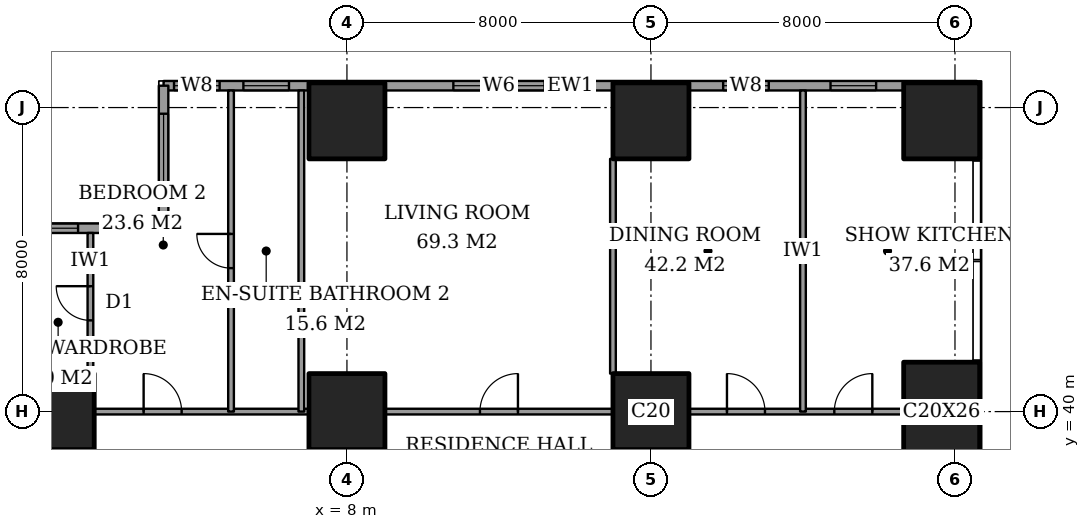
"""IFC4 building model, lengths in metres.
Left out: names, types, materials, properties, quantities, classifications, styles, units other than length and angle.
Written with IfcOpenShell. Run it as: python <this file> out.ifc"""

import sys

from ifc_helpers import new_model, si_unit, direction, frame, frame_2d, origin, origin_2d, place, context, subcontext, project, spatial, rectangle, extrude, element, fill, save


model = new_model("IFC4")
c1 = context("Model", 3, precision=1e-05, world=origin(), true_north=direction((0.0, 1.0)))
c2 = subcontext(c1, "Body", "Model", "MODEL_VIEW")
j1 = project(units=[si_unit("LENGTHUNIT", "METRE"), si_unit("PLANEANGLEUNIT", "RADIAN")], contexts=[c1])
p1 = place(None, origin())
s1 = spatial("IfcSite", under=j1, at=p1, CompositionType="ELEMENT")
p2 = place(p1, origin())
s2 = spatial("IfcBuilding", under=s1, at=p2, CompositionType="ELEMENT")
p3 = place(p2, frame((0.0, 0.0, 76.4)))
s3 = spatial("IfcBuildingStorey", under=s2, at=p3, CompositionType="ELEMENT", Elevation=76.4)
for number, where, z_axis, x_axis in (
    (1, (0.35, 40.0, 0.0), (0.0, 0.0, 1.0), (1.0, 0.0, 0.0)),
    (2, (8.0, 40.0, 0.0), (0.0, 0.0, 1.0), (1.0, 0.0, 0.0)),
    (3, (8.0, 47.65, 0.0), (0.0, 0.0, 1.0), (1.0, 0.0, 0.0)),
    (4, (16.0, 40.0, 0.0), (0.0, 0.0, 1.0), (1.0, 0.0, 0.0)),
    (5, (16.0, 47.65, 0.0), (0.0, 0.0, 1.0), (1.0, 0.0, 0.0)),
):
    element("IfcColumn", number, at=place(p3, frame(where, z_axis=z_axis, x_axis=x_axis)), inside=s3, PredefinedType="COLUMN", context=c2, shape_type="SweptSolid", body=[
        extrude(rectangle(XDim=2.0, YDim=2.0, at=origin_2d()), origin(), (0.0, 0.0, 1.0), 3.6),
    ])
p4 = place(p3, frame((23.65, 40.0, 0.0), z_axis=(0.0, 0.0, 1.0), x_axis=(1.0, 0.0, 0.0)))
e6 = element("IfcColumn", 6, at=p4, inside=s3, PredefinedType="COLUMN", context=c2, shape_type="SweptSolid", body=[
    extrude(rectangle(XDim=2.0, YDim=2.6, at=origin_2d()), origin(), (0.0, 0.0, 1.0), 3.6),
])
p5 = place(p3, frame((23.65, 47.65, 0.0), z_axis=(0.0, 0.0, 1.0), x_axis=(1.0, 0.0, 0.0)))
e7 = element("IfcColumn", 7, at=p5, inside=s3, PredefinedType="COLUMN", context=c2, shape_type="SweptSolid", body=[
    extrude(rectangle(XDim=2.0, YDim=2.0, at=origin_2d()), origin(), (0.0, 0.0, 1.0), 3.6),
])
p6 = place(p3, frame((24.575, 48.575, 0.0), z_axis=(0.0, 0.0, 1.0), x_axis=(-1.0, 0.0, 0.0)))
e8 = element("IfcWall", 8, at=p6, inside=s3, PredefinedType="SOLIDWALL", context=c2, shape_type="SweptSolid", body=[
    extrude(rectangle(XDim=21.4, YDim=0.25, at=frame_2d((10.7, 0.0))), origin(), (0.0, 0.0, 1.0), 3.6),
])
p7 = place(p6, frame((2.65, 0.0, 0.6)))
e9 = element("IfcOpeningElement", 9, at=p7, cuts=e8, PredefinedType="OPENING", context=c2, shape_type="SweptSolid", body=[
    extrude(rectangle(XDim=1.2, YDim=2.0, at=frame_2d((0.6, 1.0))), frame((0.0, 0.135, 0.0), z_axis=(0.0, -1.0, 0.0), x_axis=(1.0, 0.0, 0.0)), (0.0, 0.0, 1.0), 0.27),
])
p8 = place(p6, frame((5.475, 0.0, 0.6)))
e10 = element("IfcOpeningElement", 10, at=p8, cuts=e8, PredefinedType="OPENING", context=c2, shape_type="SweptSolid", body=[
    extrude(rectangle(XDim=1.2, YDim=2.0, at=frame_2d((0.6, 1.0))), frame((0.0, 0.135, 0.0), z_axis=(0.0, -1.0, 0.0), x_axis=(1.0, 0.0, 0.0)), (0.0, 0.0, 1.0), 0.27),
])
p9 = place(p6, frame((11.375, 0.0, 0.6)))
e11 = element("IfcOpeningElement", 11, at=p9, cuts=e8, PredefinedType="OPENING", context=c2, shape_type="SweptSolid", body=[
    extrude(rectangle(XDim=2.4, YDim=2.0, at=frame_2d((1.2, 1.0))), frame((0.0, 0.135, 0.0), z_axis=(0.0, -1.0, 0.0), x_axis=(1.0, 0.0, 0.0)), (0.0, 0.0, 1.0), 0.27),
])
p10 = place(p6, frame((18.1, 0.0, 0.6)))
e12 = element("IfcOpeningElement", 12, at=p10, cuts=e8, PredefinedType="OPENING", context=c2, shape_type="SweptSolid", body=[
    extrude(rectangle(XDim=1.2, YDim=2.0, at=frame_2d((0.6, 1.0))), frame((0.0, 0.135, 0.0), z_axis=(0.0, -1.0, 0.0), x_axis=(1.0, 0.0, 0.0)), (0.0, 0.0, 1.0), 0.27),
])
p11 = place(p6, frame((19.925, 0.0, 0.6)))
e13 = element("IfcOpeningElement", 13, at=p11, cuts=e8, PredefinedType="OPENING", context=c2, shape_type="SweptSolid", body=[
    extrude(rectangle(XDim=1.2, YDim=2.0, at=frame_2d((0.6, 1.0))), frame((0.0, 0.135, 0.0), z_axis=(0.0, -1.0, 0.0), x_axis=(1.0, 0.0, 0.0)), (0.0, 0.0, 1.0), 0.27),
])
p12 = place(p3, frame((3.175, 48.575, 0.0), z_axis=(0.0, 0.0, 1.0), x_axis=(0.0, -1.0, 0.0)))
e14 = element("IfcWall", 14, at=p12, inside=s3, PredefinedType="SOLIDWALL", context=c2, shape_type="SweptSolid", body=[
    extrude(rectangle(XDim=3.75, YDim=0.25, at=frame_2d((1.875, 0.0))), origin(), (0.0, 0.0, 1.0), 3.6),
])
p13 = place(p12, frame((0.738, 0.0, 0.6)))
e15 = element("IfcOpeningElement", 15, at=p13, cuts=e14, PredefinedType="OPENING", context=c2, shape_type="SweptSolid", body=[
    extrude(rectangle(XDim=2.4, YDim=2.0, at=frame_2d((1.2, 1.0))), frame((0.0, 0.135, 0.0), z_axis=(0.0, -1.0, 0.0), x_axis=(1.0, 0.0, 0.0)), (0.0, 0.0, 1.0), 0.27),
])
p14 = place(p3, frame((3.175, 44.825, 0.0), z_axis=(0.0, 0.0, 1.0), x_axis=(-1.0, 0.0, 0.0)))
e16 = element("IfcWall", 16, at=p14, inside=s3, PredefinedType="SOLIDWALL", context=c2, shape_type="SweptSolid", body=[
    extrude(rectangle(XDim=3.75, YDim=0.25, at=frame_2d((1.875, 0.0))), origin(), (0.0, 0.0, 1.0), 3.6),
])
p15 = place(p14, frame((0.363, 0.0, 0.6)))
e17 = element("IfcOpeningElement", 17, at=p15, cuts=e16, PredefinedType="OPENING", context=c2, shape_type="SweptSolid", body=[
    extrude(rectangle(XDim=1.2, YDim=2.0, at=frame_2d((0.6, 1.0))), frame((0.0, 0.135, 0.0), z_axis=(0.0, -1.0, 0.0), x_axis=(1.0, 0.0, 0.0)), (0.0, 0.0, 1.0), 0.27),
])
p16 = place(p14, frame((2.25, 0.0, 0.6)))
e18 = element("IfcOpeningElement", 18, at=p16, cuts=e16, PredefinedType="OPENING", context=c2, shape_type="SweptSolid", body=[
    extrude(rectangle(XDim=1.2, YDim=2.0, at=frame_2d((0.6, 1.0))), frame((0.0, 0.135, 0.0), z_axis=(0.0, -1.0, 0.0), x_axis=(1.0, 0.0, 0.0)), (0.0, 0.0, 1.0), 0.27),
])
p17 = place(p3, frame((1.35, 40.0, 0.0), z_axis=(0.0, 0.0, 1.0), x_axis=(1.0, 0.0, 0.0)))
e19 = element("IfcWall", 19, at=p17, inside=s3, PredefinedType="PARTITIONING", context=c2, shape_type="SweptSolid", body=[
    extrude(rectangle(XDim=5.65, YDim=0.15, at=frame_2d((2.825, 0.0))), origin(), (0.0, 0.0, 1.0), 3.35),
])
p18 = place(p17, frame((1.3, 0.0, 0.0)))
e20 = element("IfcOpeningElement", 20, at=p18, cuts=e19, PredefinedType="OPENING", context=c2, shape_type="SweptSolid", body=[
    extrude(rectangle(XDim=1.0, YDim=2.1, at=frame_2d((0.5, 1.05))), frame((0.0, 0.085, 0.0), z_axis=(0.0, -1.0, 0.0), x_axis=(1.0, 0.0, 0.0)), (0.0, 0.0, 1.0), 0.17),
])
p19 = place(p3, frame((9.0, 40.0, 0.0), z_axis=(0.0, 0.0, 1.0), x_axis=(1.0, 0.0, 0.0)))
e21 = element("IfcWall", 21, at=p19, inside=s3, PredefinedType="PARTITIONING", context=c2, shape_type="SweptSolid", body=[
    extrude(rectangle(XDim=6.0, YDim=0.15, at=frame_2d((3.0, 0.0))), origin(), (0.0, 0.0, 1.0), 3.35),
])
p20 = place(p19, frame((2.5, 0.0, 0.0)))
e22 = element("IfcOpeningElement", 22, at=p20, cuts=e21, PredefinedType="OPENING", context=c2, shape_type="SweptSolid", body=[
    extrude(rectangle(XDim=1.0, YDim=2.1, at=frame_2d((0.5, 1.05))), frame((0.0, 0.085, 0.0), z_axis=(0.0, -1.0, 0.0), x_axis=(1.0, 0.0, 0.0)), (0.0, 0.0, 1.0), 0.17),
])
p21 = place(p3, frame((17.0, 40.0, 0.0), z_axis=(0.0, 0.0, 1.0), x_axis=(1.0, 0.0, 0.0)))
e23 = element("IfcWall", 23, at=p21, inside=s3, PredefinedType="PARTITIONING", context=c2, shape_type="SweptSolid", body=[
    extrude(rectangle(XDim=5.65, YDim=0.15, at=frame_2d((2.825, 0.0))), origin(), (0.0, 0.0, 1.0), 3.35),
])
p22 = place(p21, frame((1.0, 0.0, 0.0)))
e24 = element("IfcOpeningElement", 24, at=p22, cuts=e23, PredefinedType="OPENING", context=c2, shape_type="SweptSolid", body=[
    extrude(rectangle(XDim=1.0, YDim=2.1, at=frame_2d((0.5, 1.05))), frame((0.0, 0.085, 0.0), z_axis=(0.0, -1.0, 0.0), x_axis=(1.0, 0.0, 0.0)), (0.0, 0.0, 1.0), 0.17),
])
p23 = place(p21, frame((3.825, 0.0, 0.0)))
e25 = element("IfcOpeningElement", 25, at=p23, cuts=e23, PredefinedType="OPENING", context=c2, shape_type="SweptSolid", body=[
    extrude(rectangle(XDim=1.0, YDim=2.1, at=frame_2d((0.5, 1.05))), frame((0.0, 0.085, 0.0), z_axis=(0.0, -1.0, 0.0), x_axis=(1.0, 0.0, 0.0)), (0.0, 0.0, 1.0), 0.17),
])
p24 = place(p3, frame((1.25, 41.0, 0.0), z_axis=(0.0, 0.0, 1.0), x_axis=(0.0, 1.0, 0.0)))
e26 = element("IfcWall", 26, at=p24, inside=s3, PredefinedType="PARTITIONING", context=c2, shape_type="SweptSolid", body=[
    extrude(rectangle(XDim=3.7, YDim=0.15, at=frame_2d((1.85, 0.0))), origin(), (0.0, 0.0, 1.0), 3.35),
])
p25 = place(p24, frame((1.4, 0.0, 0.0)))
e27 = element("IfcOpeningElement", 27, at=p25, cuts=e26, PredefinedType="OPENING", context=c2, shape_type="SweptSolid", body=[
    extrude(rectangle(XDim=0.9, YDim=2.1, at=frame_2d((0.45, 1.05))), frame((0.0, 0.085, 0.0), z_axis=(0.0, -1.0, 0.0), x_axis=(1.0, 0.0, 0.0)), (0.0, 0.0, 1.0), 0.17),
])
p26 = place(p3, frame((4.95, 40.0, 0.0), z_axis=(0.0, 0.0, 1.0), x_axis=(0.0, 1.0, 0.0)))
e28 = element("IfcWall", 28, at=p26, inside=s3, PredefinedType="PARTITIONING", context=c2, shape_type="SweptSolid", body=[
    extrude(rectangle(XDim=8.45, YDim=0.15, at=frame_2d((4.225, 0.0))), origin(), (0.0, 0.0, 1.0), 3.35),
])
p27 = place(p26, frame((3.775, 0.0, 0.0)))
e29 = element("IfcOpeningElement", 29, at=p27, cuts=e28, PredefinedType="OPENING", context=c2, shape_type="SweptSolid", body=[
    extrude(rectangle(XDim=0.9, YDim=2.1, at=frame_2d((0.45, 1.05))), frame((0.0, 0.085, 0.0), z_axis=(0.0, -1.0, 0.0), x_axis=(1.0, 0.0, 0.0)), (0.0, 0.0, 1.0), 0.17),
])
p28 = place(p3, frame((6.8, 40.0, 0.0), z_axis=(0.0, 0.0, 1.0), x_axis=(0.0, 1.0, 0.0)))
e30 = element("IfcWall", 30, at=p28, inside=s3, PredefinedType="PARTITIONING", context=c2, shape_type="SweptSolid", body=[
    extrude(rectangle(XDim=8.45, YDim=0.15, at=frame_2d((4.225, 0.0))), origin(), (0.0, 0.0, 1.0), 3.35),
])
p29 = place(p3, frame((15.0, 41.0, 0.0), z_axis=(0.0, 0.0, 1.0), x_axis=(0.0, 1.0, 0.0)))
e31 = element("IfcWall", 31, at=p29, inside=s3, PredefinedType="PARTITIONING", context=c2, shape_type="SweptSolid", body=[
    extrude(rectangle(XDim=5.65, YDim=0.15, at=frame_2d((2.825, 0.0))), origin(), (0.0, 0.0, 1.0), 3.35),
])
p30 = place(p3, frame((20.0, 40.0, 0.0), z_axis=(0.0, 0.0, 1.0), x_axis=(0.0, 1.0, 0.0)))
e32 = element("IfcWall", 32, at=p30, inside=s3, PredefinedType="PARTITIONING", context=c2, shape_type="SweptSolid", body=[
    extrude(rectangle(XDim=8.45, YDim=0.15, at=frame_2d((4.225, 0.0))), origin(), (0.0, 0.0, 1.0), 3.35),
])
p31 = place(p7, origin())
e33 = element("IfcWindow", 33, at=p31, inside=s3, PartitioningType="SINGLE_PANEL", PredefinedType="WINDOW", context=c2, shape_type="SweptSolid", body=[
    extrude(rectangle(XDim=1.2, YDim=2.0, at=frame_2d((0.6, 1.0))), frame((0.0, 0.03, 0.0), z_axis=(0.0, -1.0, 0.0), x_axis=(1.0, 0.0, 0.0)), (0.0, 0.0, 1.0), 0.06),
])
fill(e9, e33)
p32 = place(p8, origin())
e34 = element("IfcWindow", 34, at=p32, inside=s3, PartitioningType="SINGLE_PANEL", PredefinedType="WINDOW", context=c2, shape_type="SweptSolid", body=[
    extrude(rectangle(XDim=1.2, YDim=2.0, at=frame_2d((0.6, 1.0))), frame((0.0, 0.03, 0.0), z_axis=(0.0, -1.0, 0.0), x_axis=(1.0, 0.0, 0.0)), (0.0, 0.0, 1.0), 0.06),
])
fill(e10, e34)
p33 = place(p9, origin())
e35 = element("IfcWindow", 35, at=p33, inside=s3, PartitioningType="SINGLE_PANEL", PredefinedType="WINDOW", context=c2, shape_type="SweptSolid", body=[
    extrude(rectangle(XDim=2.4, YDim=2.0, at=frame_2d((1.2, 1.0))), frame((0.0, 0.03, 0.0), z_axis=(0.0, -1.0, 0.0), x_axis=(1.0, 0.0, 0.0)), (0.0, 0.0, 1.0), 0.06),
])
fill(e11, e35)
p34 = place(p10, origin())
e36 = element("IfcWindow", 36, at=p34, inside=s3, PartitioningType="SINGLE_PANEL", PredefinedType="WINDOW", context=c2, shape_type="SweptSolid", body=[
    extrude(rectangle(XDim=1.2, YDim=2.0, at=frame_2d((0.6, 1.0))), frame((0.0, 0.03, 0.0), z_axis=(0.0, -1.0, 0.0), x_axis=(1.0, 0.0, 0.0)), (0.0, 0.0, 1.0), 0.06),
])
fill(e12, e36)
p35 = place(p11, origin())
e37 = element("IfcWindow", 37, at=p35, inside=s3, PartitioningType="SINGLE_PANEL", PredefinedType="WINDOW", context=c2, shape_type="SweptSolid", body=[
    extrude(rectangle(XDim=1.2, YDim=2.0, at=frame_2d((0.6, 1.0))), frame((0.0, 0.03, 0.0), z_axis=(0.0, -1.0, 0.0), x_axis=(1.0, 0.0, 0.0)), (0.0, 0.0, 1.0), 0.06),
])
fill(e13, e37)
p36 = place(p13, origin())
e38 = element("IfcWindow", 38, at=p36, inside=s3, PartitioningType="SINGLE_PANEL", PredefinedType="WINDOW", context=c2, shape_type="SweptSolid", body=[
    extrude(rectangle(XDim=2.4, YDim=2.0, at=frame_2d((1.2, 1.0))), frame((0.0, 0.03, 0.0), z_axis=(0.0, -1.0, 0.0), x_axis=(1.0, 0.0, 0.0)), (0.0, 0.0, 1.0), 0.06),
])
fill(e15, e38)
p37 = place(p15, origin())
e39 = element("IfcWindow", 39, at=p37, inside=s3, PartitioningType="SINGLE_PANEL", PredefinedType="WINDOW", context=c2, shape_type="SweptSolid", body=[
    extrude(rectangle(XDim=1.2, YDim=2.0, at=frame_2d((0.6, 1.0))), frame((0.0, 0.03, 0.0), z_axis=(0.0, -1.0, 0.0), x_axis=(1.0, 0.0, 0.0)), (0.0, 0.0, 1.0), 0.06),
])
fill(e17, e39)
p38 = place(p16, origin())
e40 = element("IfcWindow", 40, at=p38, inside=s3, PartitioningType="SINGLE_PANEL", PredefinedType="WINDOW", context=c2, shape_type="SweptSolid", body=[
    extrude(rectangle(XDim=1.2, YDim=2.0, at=frame_2d((0.6, 1.0))), frame((0.0, 0.03, 0.0), z_axis=(0.0, -1.0, 0.0), x_axis=(1.0, 0.0, 0.0)), (0.0, 0.0, 1.0), 0.06),
])
fill(e18, e40)
p39 = place(p25, origin())
e41 = element("IfcDoor", 41, at=p39, inside=s3, OperationType="SINGLE_SWING_LEFT", PredefinedType="DOOR", context=c2, shape_type="SweptSolid", body=[
    extrude(rectangle(XDim=0.9, YDim=2.1, at=frame_2d((0.45, 1.05))), frame((0.0, 0.025, 0.0), z_axis=(0.0, -1.0, 0.0), x_axis=(1.0, 0.0, 0.0)), (0.0, 0.0, 1.0), 0.05),
])
fill(e27, e41)
p40 = place(p18, origin())
e42 = element("IfcDoor", 42, at=p40, inside=s3, OperationType="SINGLE_SWING_RIGHT", PredefinedType="DOOR", context=c2, shape_type="SweptSolid", body=[
    extrude(rectangle(XDim=1.0, YDim=2.1, at=frame_2d((0.5, 1.05))), frame((0.0, 0.025, 0.0), z_axis=(0.0, -1.0, 0.0), x_axis=(1.0, 0.0, 0.0)), (0.0, 0.0, 1.0), 0.05),
])
fill(e20, e42)
p41 = place(p27, origin())
e43 = element("IfcDoor", 43, at=p41, inside=s3, OperationType="SINGLE_SWING_LEFT", PredefinedType="DOOR", context=c2, shape_type="SweptSolid", body=[
    extrude(rectangle(XDim=0.9, YDim=2.1, at=frame_2d((0.45, 1.05))), frame((0.0, 0.025, 0.0), z_axis=(0.0, -1.0, 0.0), x_axis=(1.0, 0.0, 0.0)), (0.0, 0.0, 1.0), 0.05),
])
fill(e29, e43)
p42 = place(p20, origin())
e44 = element("IfcDoor", 44, at=p42, inside=s3, OperationType="SINGLE_SWING_LEFT", PredefinedType="DOOR", context=c2, shape_type="SweptSolid", body=[
    extrude(rectangle(XDim=1.0, YDim=2.1, at=frame_2d((0.5, 1.05))), frame((0.0, 0.025, 0.0), z_axis=(0.0, -1.0, 0.0), x_axis=(1.0, 0.0, 0.0)), (0.0, 0.0, 1.0), 0.05),
])
fill(e22, e44)
p43 = place(p22, origin())
e45 = element("IfcDoor", 45, at=p43, inside=s3, OperationType="SINGLE_SWING_RIGHT", PredefinedType="DOOR", context=c2, shape_type="SweptSolid", body=[
    extrude(rectangle(XDim=1.0, YDim=2.1, at=frame_2d((0.5, 1.05))), frame((0.0, 0.025, 0.0), z_axis=(0.0, -1.0, 0.0), x_axis=(1.0, 0.0, 0.0)), (0.0, 0.0, 1.0), 0.05),
])
fill(e24, e45)
p44 = place(p23, origin())
e46 = element("IfcDoor", 46, at=p44, inside=s3, OperationType="SINGLE_SWING_LEFT", PredefinedType="DOOR", context=c2, shape_type="SweptSolid", body=[
    extrude(rectangle(XDim=1.0, YDim=2.1, at=frame_2d((0.5, 1.05))), frame((0.0, 0.025, 0.0), z_axis=(0.0, -1.0, 0.0), x_axis=(1.0, 0.0, 0.0)), (0.0, 0.0, 1.0), 0.05),
])
fill(e25, e46)
save(model, sys.argv[1])
